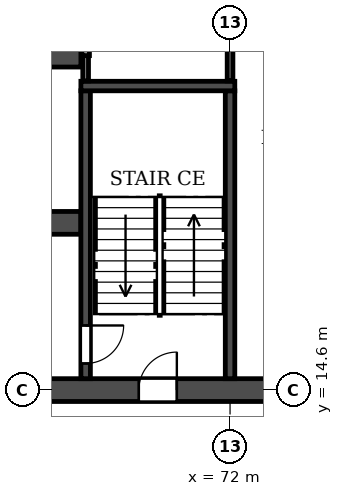
"""IFC4 building model, lengths in metres.
Left out: names, types, materials, properties, quantities, classifications, styles, units other than length and angle.
Written with IfcOpenShell. Run it as: python <this file> out.ifc"""

import sys

from ifc_helpers import new_model, si_unit, direction, frame, frame_2d, origin, place, context, subcontext, project, spatial, rectangle, extrude, element, fill, save


model = new_model("IFC4")
c1 = context("Model", 3, precision=1e-05, world=origin(), true_north=direction((0.0, 1.0)))
c2 = subcontext(c1, "Body", "Model", "MODEL_VIEW")
j1 = project(units=[si_unit("LENGTHUNIT", "METRE"), si_unit("PLANEANGLEUNIT", "RADIAN")], contexts=[c1])
p1 = place(None, origin())
s1 = spatial("IfcSite", under=j1, at=p1, CompositionType="ELEMENT")
p2 = place(p1, origin())
s2 = spatial("IfcBuilding", under=s1, at=p2, CompositionType="ELEMENT")
p3 = place(p2, frame((0.0, 0.0, 23.4)))
s3 = spatial("IfcBuildingStorey", under=s2, at=p3, CompositionType="ELEMENT", Elevation=23.4)
p4 = place(p3, frame((2.6, 14.6, 0.0), z_axis=(0.0, 0.0, 1.0), x_axis=(1.0, 0.0, 0.0)))
e1 = element("IfcWall", 1, at=p4, inside=s3, PredefinedType="SOLIDWALL", context=c2, shape_type="SweptSolid", body=[
    extrude(rectangle(XDim=96.8, YDim=0.6, at=frame_2d((48.4, 0.0))), origin(), (0.0, 0.0, 1.0), 3.05),
])
p5 = place(p4, frame((7.2, 0.0, 0.0)))
e2 = element("IfcOpeningElement", 2, at=p5, cuts=e1, PredefinedType="OPENING", context=c2, shape_type="SweptSolid", body=[
    extrude(rectangle(XDim=1.0, YDim=2.1, at=frame_2d((0.5, 1.05))), frame((0.0, 0.31, 0.0), z_axis=(0.0, -1.0, 0.0), x_axis=(1.0, 0.0, 0.0)), (0.0, 0.0, 1.0), 0.62),
])
p6 = place(p4, frame((16.3, 0.0, 0.0)))
e3 = element("IfcOpeningElement", 3, at=p6, cuts=e1, PredefinedType="OPENING", context=c2, shape_type="SweptSolid", body=[
    extrude(rectangle(XDim=1.0, YDim=2.1, at=frame_2d((0.5, 1.05))), frame((0.0, 0.31, 0.0), z_axis=(0.0, -1.0, 0.0), x_axis=(1.0, 0.0, 0.0)), (0.0, 0.0, 1.0), 0.62),
])
p7 = place(p4, frame((24.2, 0.0, 0.0)))
e4 = element("IfcOpeningElement", 4, at=p7, cuts=e1, PredefinedType="OPENING", context=c2, shape_type="SweptSolid", body=[
    extrude(rectangle(XDim=1.0, YDim=2.1, at=frame_2d((0.5, 1.05))), frame((0.0, 0.31, 0.0), z_axis=(0.0, -1.0, 0.0), x_axis=(1.0, 0.0, 0.0)), (0.0, 0.0, 1.0), 0.62),
])
p8 = place(p4, frame((28.8, 0.0, 0.0)))
e5 = element("IfcOpeningElement", 5, at=p8, cuts=e1, PredefinedType="OPENING", context=c2, shape_type="SweptSolid", body=[
    extrude(rectangle(XDim=1.0, YDim=2.1, at=frame_2d((0.5, 1.05))), frame((0.0, 0.31, 0.0), z_axis=(0.0, -1.0, 0.0), x_axis=(1.0, 0.0, 0.0)), (0.0, 0.0, 1.0), 0.62),
])
p9 = place(p4, frame((40.1, 0.0, 0.0)))
e6 = element("IfcOpeningElement", 6, at=p9, cuts=e1, PredefinedType="OPENING", context=c2, shape_type="SweptSolid", body=[
    extrude(rectangle(XDim=1.0, YDim=2.1, at=frame_2d((0.5, 1.05))), frame((0.0, 0.31, 0.0), z_axis=(0.0, -1.0, 0.0), x_axis=(1.0, 0.0, 0.0)), (0.0, 0.0, 1.0), 0.62),
])
p10 = place(p4, frame((44.0, 0.0, 0.0)))
e7 = element("IfcOpeningElement", 7, at=p10, cuts=e1, PredefinedType="OPENING", context=c2, shape_type="SweptSolid", body=[
    extrude(rectangle(XDim=1.0, YDim=2.1, at=frame_2d((0.5, 1.05))), frame((0.0, 0.31, 0.0), z_axis=(0.0, -1.0, 0.0), x_axis=(1.0, 0.0, 0.0)), (0.0, 0.0, 1.0), 0.62),
])
p11 = place(p4, frame((47.9, 0.0, 0.0)))
e8 = element("IfcOpeningElement", 8, at=p11, cuts=e1, PredefinedType="OPENING", context=c2, shape_type="SweptSolid", body=[
    extrude(rectangle(XDim=1.0, YDim=2.1, at=frame_2d((0.5, 1.05))), frame((0.0, 0.31, 0.0), z_axis=(0.0, -1.0, 0.0), x_axis=(1.0, 0.0, 0.0)), (0.0, 0.0, 1.0), 0.62),
])
p12 = place(p4, frame((53.1, 0.0, 0.0)))
e9 = element("IfcOpeningElement", 9, at=p12, cuts=e1, PredefinedType="OPENING", context=c2, shape_type="SweptSolid", body=[
    extrude(rectangle(XDim=1.0, YDim=2.1, at=frame_2d((0.5, 1.05))), frame((0.0, 0.31, 0.0), z_axis=(0.0, -1.0, 0.0), x_axis=(1.0, 0.0, 0.0)), (0.0, 0.0, 1.0), 0.62),
])
p13 = place(p4, frame((67.0, 0.0, 0.0)))
e10 = element("IfcOpeningElement", 10, at=p13, cuts=e1, PredefinedType="OPENING", context=c2, shape_type="SweptSolid", body=[
    extrude(rectangle(XDim=1.0, YDim=2.1, at=frame_2d((0.5, 1.05))), frame((0.0, 0.31, 0.0), z_axis=(0.0, -1.0, 0.0), x_axis=(1.0, 0.0, 0.0)), (0.0, 0.0, 1.0), 0.62),
])
p14 = place(p4, frame((71.6, 0.0, 0.0)))
e11 = element("IfcOpeningElement", 11, at=p14, cuts=e1, PredefinedType="OPENING", context=c2, shape_type="SweptSolid", body=[
    extrude(rectangle(XDim=1.0, YDim=2.1, at=frame_2d((0.5, 1.05))), frame((0.0, 0.31, 0.0), z_axis=(0.0, -1.0, 0.0), x_axis=(1.0, 0.0, 0.0)), (0.0, 0.0, 1.0), 0.62),
])
p15 = place(p4, frame((79.5, 0.0, 0.0)))
e12 = element("IfcOpeningElement", 12, at=p15, cuts=e1, PredefinedType="OPENING", context=c2, shape_type="SweptSolid", body=[
    extrude(rectangle(XDim=1.0, YDim=2.1, at=frame_2d((0.5, 1.05))), frame((0.0, 0.31, 0.0), z_axis=(0.0, -1.0, 0.0), x_axis=(1.0, 0.0, 0.0)), (0.0, 0.0, 1.0), 0.62),
])
p16 = place(p4, frame((83.15, 0.0, 0.0)))
e13 = element("IfcOpeningElement", 13, at=p16, cuts=e1, PredefinedType="OPENING", context=c2, shape_type="SweptSolid", body=[
    extrude(rectangle(XDim=1.0, YDim=2.1, at=frame_2d((0.5, 1.05))), frame((0.0, 0.31, 0.0), z_axis=(0.0, -1.0, 0.0), x_axis=(1.0, 0.0, 0.0)), (0.0, 0.0, 1.0), 0.62),
])
p17 = place(p4, frame((90.85, 0.0, 0.0)))
e14 = element("IfcOpeningElement", 14, at=p17, cuts=e1, PredefinedType="OPENING", context=c2, shape_type="SweptSolid", body=[
    extrude(rectangle(XDim=1.0, YDim=2.1, at=frame_2d((0.5, 1.05))), frame((0.0, 0.31, 0.0), z_axis=(0.0, -1.0, 0.0), x_axis=(1.0, 0.0, 0.0)), (0.0, 0.0, 1.0), 0.62),
])
p18 = place(p3, frame((33.925, 19.0, 0.0), z_axis=(0.0, 0.0, 1.0), x_axis=(1.0, 0.0, 0.0)))
e15 = element("IfcWall", 15, at=p18, inside=s3, PredefinedType="SOLIDWALL", context=c2, shape_type="SweptSolid", body=[
    extrude(rectangle(XDim=34.15, YDim=0.6, at=frame_2d((17.075, 0.0))), origin(), (0.0, 0.0, 1.0), 3.05),
])
p19 = place(p18, frame((16.175, 0.0, 0.0)))
e16 = element("IfcOpeningElement", 16, at=p19, cuts=e15, PredefinedType="OPENING", context=c2, shape_type="SweptSolid", body=[
    extrude(rectangle(XDim=1.8, YDim=2.1, at=frame_2d((0.9, 1.05))), frame((0.0, 0.31, 0.0), z_axis=(0.0, -1.0, 0.0), x_axis=(1.0, 0.0, 0.0)), (0.0, 0.0, 1.0), 0.62),
])
p20 = place(p18, frame((1.525, 0.0, 0.0)))
e17 = element("IfcOpeningElement", 17, at=p20, cuts=e15, PredefinedType="OPENING", context=c2, shape_type="SweptSolid", body=[
    extrude(rectangle(XDim=1.8, YDim=2.1, at=frame_2d((0.9, 1.05))), frame((0.0, 0.31, 0.0), z_axis=(0.0, -1.0, 0.0), x_axis=(1.0, 0.0, 0.0)), (0.0, 0.0, 1.0), 0.62),
])
p21 = place(p18, frame((8.725, 0.0, 0.0)))
e18 = element("IfcOpeningElement", 18, at=p21, cuts=e15, PredefinedType="OPENING", context=c2, shape_type="SweptSolid", body=[
    extrude(rectangle(XDim=1.1, YDim=2.1, at=frame_2d((0.55, 1.05))), frame((0.0, 0.31, 0.0), z_axis=(0.0, -1.0, 0.0), x_axis=(1.0, 0.0, 0.0)), (0.0, 0.0, 1.0), 0.62),
])
p22 = place(p18, frame((11.325, 0.0, 0.0)))
e19 = element("IfcOpeningElement", 19, at=p22, cuts=e15, PredefinedType="OPENING", context=c2, shape_type="SweptSolid", body=[
    extrude(rectangle(XDim=1.1, YDim=2.1, at=frame_2d((0.55, 1.05))), frame((0.0, 0.31, 0.0), z_axis=(0.0, -1.0, 0.0), x_axis=(1.0, 0.0, 0.0)), (0.0, 0.0, 1.0), 0.62),
])
p23 = place(p18, frame((13.925, 0.0, 0.0)))
e20 = element("IfcOpeningElement", 20, at=p23, cuts=e15, PredefinedType="OPENING", context=c2, shape_type="SweptSolid", body=[
    extrude(rectangle(XDim=1.1, YDim=2.1, at=frame_2d((0.55, 1.05))), frame((0.0, 0.31, 0.0), z_axis=(0.0, -1.0, 0.0), x_axis=(1.0, 0.0, 0.0)), (0.0, 0.0, 1.0), 0.62),
])
p24 = place(p18, frame((19.125, 0.0, 0.0)))
e21 = element("IfcOpeningElement", 21, at=p24, cuts=e15, PredefinedType="OPENING", context=c2, shape_type="SweptSolid", body=[
    extrude(rectangle(XDim=1.1, YDim=2.1, at=frame_2d((0.55, 1.05))), frame((0.0, 0.31, 0.0), z_axis=(0.0, -1.0, 0.0), x_axis=(1.0, 0.0, 0.0)), (0.0, 0.0, 1.0), 0.62),
])
p25 = place(p18, frame((21.725, 0.0, 0.0)))
e22 = element("IfcOpeningElement", 22, at=p25, cuts=e15, PredefinedType="OPENING", context=c2, shape_type="SweptSolid", body=[
    extrude(rectangle(XDim=1.1, YDim=2.1, at=frame_2d((0.55, 1.05))), frame((0.0, 0.31, 0.0), z_axis=(0.0, -1.0, 0.0), x_axis=(1.0, 0.0, 0.0)), (0.0, 0.0, 1.0), 0.62),
])
p26 = place(p18, frame((24.325, 0.0, 0.0)))
e23 = element("IfcOpeningElement", 23, at=p26, cuts=e15, PredefinedType="OPENING", context=c2, shape_type="SweptSolid", body=[
    extrude(rectangle(XDim=1.1, YDim=2.1, at=frame_2d((0.55, 1.05))), frame((0.0, 0.31, 0.0), z_axis=(0.0, -1.0, 0.0), x_axis=(1.0, 0.0, 0.0)), (0.0, 0.0, 1.0), 0.62),
])
p27 = place(p18, frame((30.825, 0.0, 0.0)))
e24 = element("IfcOpeningElement", 24, at=p27, cuts=e15, PredefinedType="OPENING", context=c2, shape_type="SweptSolid", body=[
    extrude(rectangle(XDim=1.8, YDim=2.1, at=frame_2d((0.9, 1.05))), frame((0.0, 0.31, 0.0), z_axis=(0.0, -1.0, 0.0), x_axis=(1.0, 0.0, 0.0)), (0.0, 0.0, 1.0), 0.62),
])
p28 = place(p3, frame((33.925, 23.4, 0.0), z_axis=(0.0, 0.0, 1.0), x_axis=(1.0, 0.0, 0.0)))
e25 = element("IfcWall", 25, at=p28, inside=s3, PredefinedType="SOLIDWALL", context=c2, shape_type="SweptSolid", body=[
    extrude(rectangle(XDim=34.15, YDim=0.6, at=frame_2d((17.075, 0.0))), origin(), (0.0, 0.0, 1.0), 3.05),
])
p29 = place(p28, frame((16.175, 0.0, 0.0)))
e26 = element("IfcOpeningElement", 26, at=p29, cuts=e25, PredefinedType="OPENING", context=c2, shape_type="SweptSolid", body=[
    extrude(rectangle(XDim=1.8, YDim=2.1, at=frame_2d((0.9, 1.05))), frame((0.0, 0.31, 0.0), z_axis=(0.0, -1.0, 0.0), x_axis=(1.0, 0.0, 0.0)), (0.0, 0.0, 1.0), 0.62),
])
p30 = place(p28, frame((11.025, 0.0, 0.0)))
e27 = element("IfcOpeningElement", 27, at=p30, cuts=e25, PredefinedType="OPENING", context=c2, shape_type="SweptSolid", body=[
    extrude(rectangle(XDim=1.1, YDim=2.1, at=frame_2d((0.55, 1.05))), frame((0.0, 0.31, 0.0), z_axis=(0.0, -1.0, 0.0), x_axis=(1.0, 0.0, 0.0)), (0.0, 0.0, 1.0), 0.62),
])
p31 = place(p3, frame((68.2, 14.9, 0.0), z_axis=(0.0, 0.0, 1.0), x_axis=(0.0, 1.0, 0.0)))
e28 = element("IfcWall", 28, at=p31, inside=s3, PredefinedType="SOLIDWALL", context=c2, shape_type="SweptSolid", body=[
    extrude(rectangle(XDim=7.575, YDim=0.25, at=frame_2d((3.788, 0.0))), origin(), (0.0, 0.0, 1.0), 3.05),
])
p32 = place(p31, frame((0.4, 0.0, 0.0)))
e29 = element("IfcOpeningElement", 29, at=p32, cuts=e28, PredefinedType="OPENING", context=c2, shape_type="SweptSolid", body=[
    extrude(rectangle(XDim=1.0, YDim=2.1, at=frame_2d((0.5, 1.05))), frame((0.0, 0.135, 0.0), z_axis=(0.0, -1.0, 0.0), x_axis=(1.0, 0.0, 0.0)), (0.0, 0.0, 1.0), 0.27),
])
p33 = place(p3, frame((72.0, 14.9, 0.0), z_axis=(0.0, 0.0, 1.0), x_axis=(0.0, 1.0, 0.0)))
e30 = element("IfcWall", 30, at=p33, inside=s3, PredefinedType="SOLIDWALL", context=c2, shape_type="SweptSolid", body=[
    extrude(rectangle(XDim=7.575, YDim=0.25, at=frame_2d((3.788, 0.0))), origin(), (0.0, 0.0, 1.0), 3.05),
])
p34 = place(p3, frame((68.075, 22.6, 0.0), z_axis=(0.0, 0.0, 1.0), x_axis=(1.0, 0.0, 0.0)))
e31 = element("IfcWall", 31, at=p34, inside=s3, PredefinedType="SOLIDWALL", context=c2, shape_type="SweptSolid", body=[
    extrude(rectangle(XDim=4.05, YDim=0.25, at=frame_2d((2.025, 0.0))), origin(), (0.0, 0.0, 1.0), 3.05),
])
p35 = place(p3, frame((68.2, 22.735, 0.0), z_axis=(0.0, 0.0, 1.0), x_axis=(0.0, 1.0, 0.0)))
e32 = element("IfcWall", 32, at=p35, inside=s3, PredefinedType="PARTITIONING", context=c2, shape_type="SweptSolid", body=[
    extrude(rectangle(XDim=0.665, YDim=0.15, at=frame_2d((0.333, 0.0))), origin(), (0.0, 0.0, 1.0), 3.05),
])
p36 = place(p3, frame((72.0, 22.735, 0.0), z_axis=(0.0, 0.0, 1.0), x_axis=(0.0, 1.0, 0.0)))
e33 = element("IfcWall", 33, at=p36, inside=s3, PredefinedType="PARTITIONING", context=c2, shape_type="SweptSolid", body=[
    extrude(rectangle(XDim=4.755, YDim=0.15, at=frame_2d((2.377, 0.0))), origin(), (0.0, 0.0, 1.0), 3.05),
])
p37 = place(p3, frame((68.2, 23.4, 0.0), z_axis=(0.0, 0.0, 1.0), x_axis=(0.0, 1.0, 0.0)))
e34 = element("IfcWall", 34, at=p37, inside=s3, PredefinedType="PARTITIONING", context=c2, shape_type="SweptSolid", body=[
    extrude(rectangle(XDim=2.7, YDim=0.2, at=frame_2d((1.35, 0.0))), origin(), (0.0, 0.0, 1.0), 3.05),
])
p38 = place(p13, origin())
e35 = element("IfcDoor", 35, at=p38, inside=s3, OperationType="SINGLE_SWING_RIGHT", PredefinedType="DOOR", context=c2, shape_type="SweptSolid", body=[
    extrude(rectangle(XDim=1.0, YDim=2.1, at=frame_2d((0.5, 1.05))), frame((0.0, 0.025, 0.0), z_axis=(0.0, -1.0, 0.0), x_axis=(1.0, 0.0, 0.0)), (0.0, 0.0, 1.0), 0.05),
])
fill(e10, e35)
p39 = place(p32, frame((1.0, 0.0, 0.0), z_axis=(0.0, 0.0, 1.0), x_axis=(-1.0, 0.0, 0.0)))
e36 = element("IfcDoor", 36, at=p39, inside=s3, OperationType="SINGLE_SWING_LEFT", PredefinedType="DOOR", context=c2, shape_type="SweptSolid", body=[
    extrude(rectangle(XDim=1.0, YDim=2.1, at=frame_2d((0.5, 1.05))), frame((0.0, 0.025, 0.0), z_axis=(0.0, -1.0, 0.0), x_axis=(1.0, 0.0, 0.0)), (0.0, 0.0, 1.0), 0.05),
])
fill(e29, e36)
save(model, sys.argv[1])
